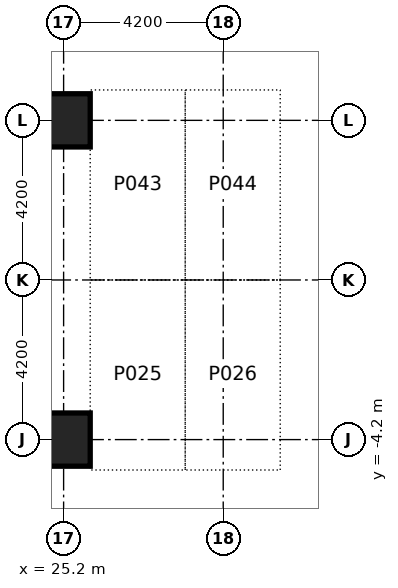
"""IFC4 building model, lengths in metres.
Left out: names, types, materials, properties, quantities, classifications, styles, units other than length and angle.
Written with IfcOpenShell. Run it as: python <this file> out.ifc"""

import sys

from ifc_helpers import new_model, si_unit, direction, frame, origin, origin_2d, place, context, subcontext, project, spatial, rectangle, extrude, element, save


model = new_model("IFC4")
c1 = context("Model", 3, precision=1e-05, world=origin(), true_north=direction((0.0, 1.0)))
c2 = subcontext(c1, "Body", "Model", "MODEL_VIEW")
j1 = project(units=[si_unit("LENGTHUNIT", "METRE"), si_unit("PLANEANGLEUNIT", "RADIAN")], contexts=[c1])
p1 = place(None, origin())
s1 = spatial("IfcSite", under=j1, at=p1, CompositionType="ELEMENT")
p2 = place(p1, origin())
s2 = spatial("IfcBuilding", under=s1, at=p2, CompositionType="ELEMENT")
p3 = place(p2, frame((0.0, 0.0, -4.2)))
s3 = spatial("IfcBuildingStorey", under=s2, at=p3, CompositionType="ELEMENT", Elevation=-4.2)
for number, where, z_axis, x_axis in (
    (1, (25.2, -4.2, -0.35), (0.0, 0.0, 1.0), (1.0, 0.0, 0.0)),
    (2, (25.2, 4.2, -0.35), (0.0, 0.0, 1.0), (1.0, 0.0, 0.0)),
):
    element("IfcColumn", number, at=place(p3, frame(where, z_axis=z_axis, x_axis=x_axis)), inside=s3, PredefinedType="COLUMN", context=c2, shape_type="SweptSolid", body=[
        extrude(rectangle(XDim=1.4, YDim=1.4, at=origin_2d()), origin(), (0.0, 0.0, 1.0), 4.1),
    ])
save(model, sys.argv[1])
